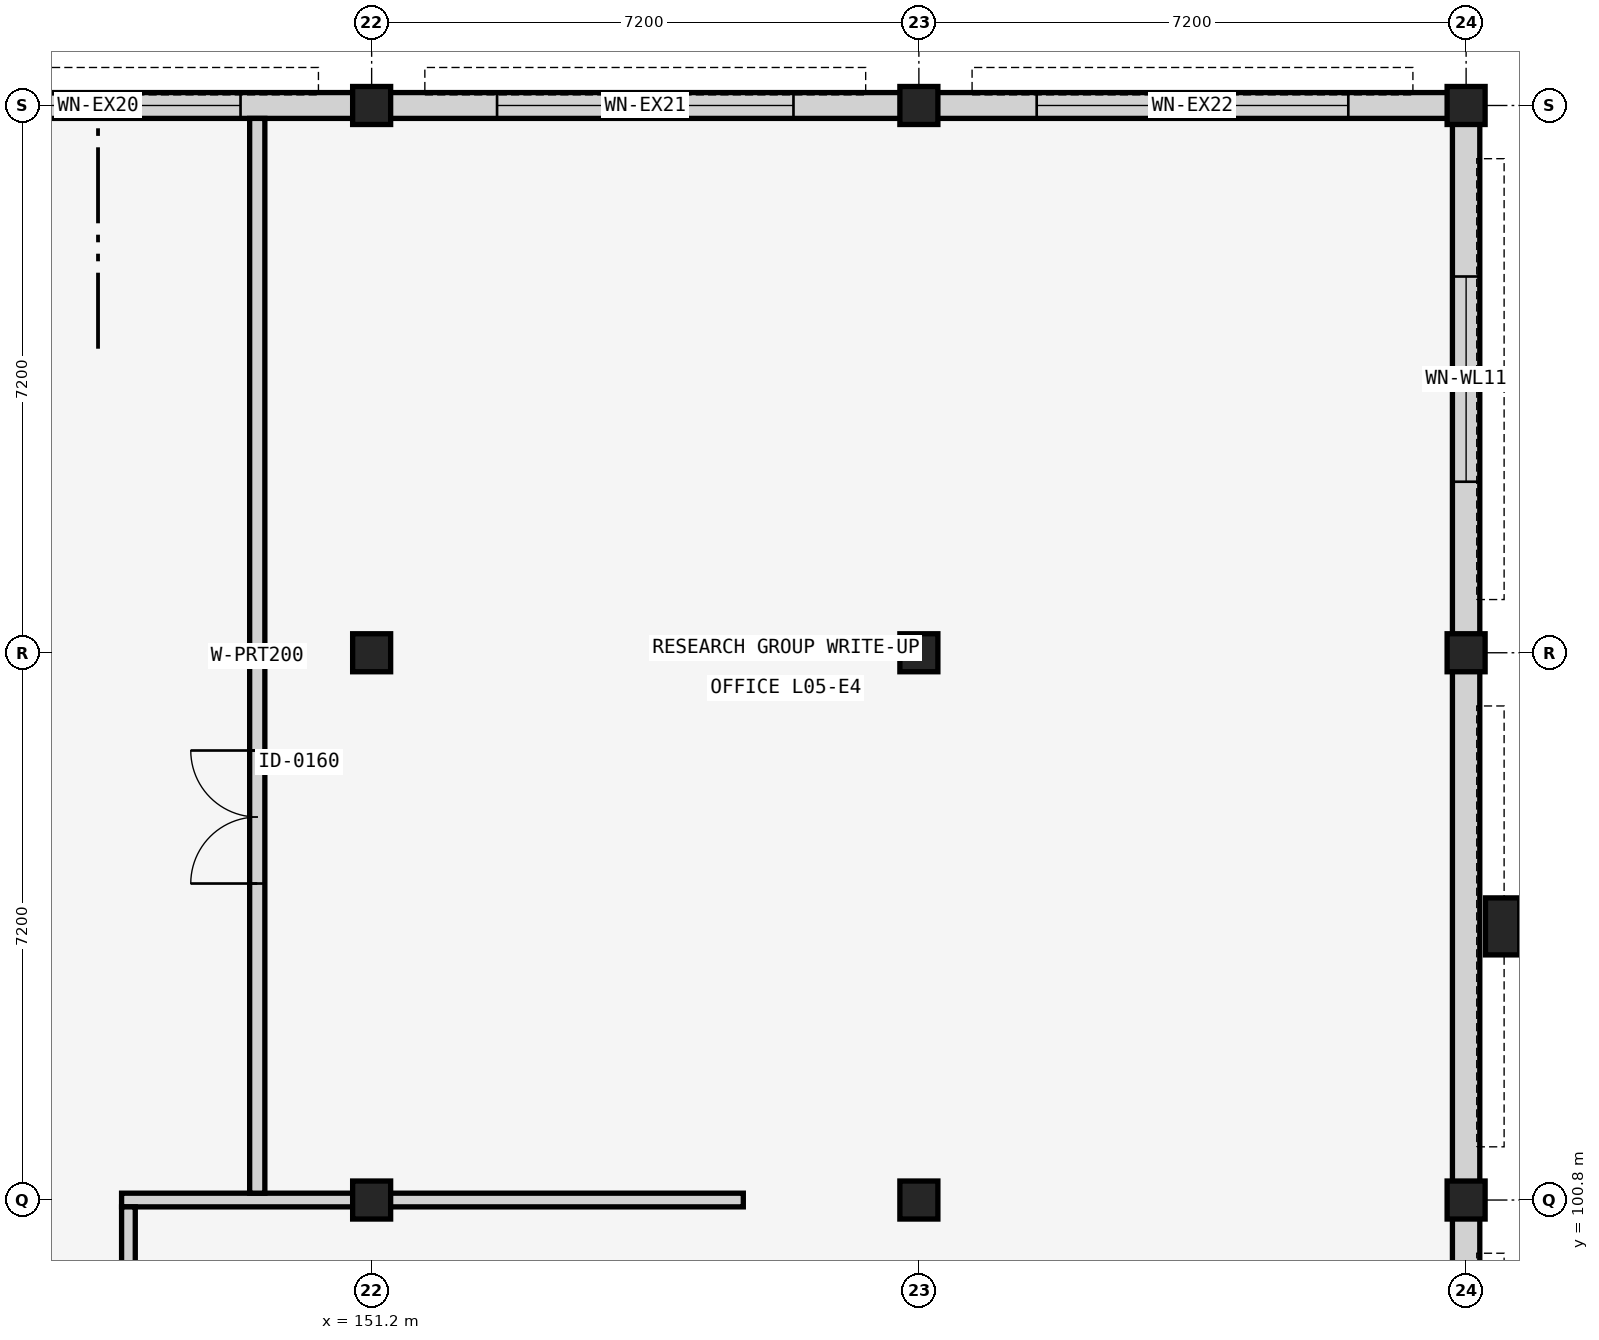
"""IFC4 building model, lengths in metres.
Left out: names, types, materials, properties, quantities, classifications, styles, units other than length and angle.
Written with IfcOpenShell. Run it as: python <this file> out.ifc"""

import sys

from ifc_helpers import new_model, si_unit, direction, frame, frame_2d, origin, origin_2d, place, context, subcontext, project, spatial, rectangle, extrude, element, fill, save


model = new_model("IFC4")
c1 = context("Model", 3, precision=1e-05, world=origin(), true_north=direction((0.0, 1.0)))
c2 = subcontext(c1, "Body", "Model", "MODEL_VIEW")
j1 = project(units=[si_unit("LENGTHUNIT", "METRE"), si_unit("PLANEANGLEUNIT", "RADIAN")], contexts=[c1])
p1 = place(None, origin())
s1 = spatial("IfcSite", under=j1, at=p1, CompositionType="ELEMENT")
p2 = place(p1, origin())
s2 = spatial("IfcBuilding", under=s1, at=p2, CompositionType="ELEMENT")
p3 = place(p2, frame((0.0, 0.0, 21.44)))
s3 = spatial("IfcBuildingStorey", under=s2, at=p3, CompositionType="ELEMENT", Elevation=21.44)
for number, where, z_axis, x_axis in (
    (1, (151.2, 100.8, 0.0), (0.0, 0.0, 1.0), (1.0, 0.0, 0.0)),
    (2, (151.2, 108.0, 0.0), (0.0, 0.0, 1.0), (1.0, 0.0, 0.0)),
    (3, (151.2, 115.2, 0.0), (0.0, 0.0, 1.0), (1.0, 0.0, 0.0)),
    (4, (158.4, 100.8, 0.0), (0.0, 0.0, 1.0), (1.0, 0.0, 0.0)),
    (5, (158.4, 108.0, 0.0), (0.0, 0.0, 1.0), (1.0, 0.0, 0.0)),
    (6, (158.4, 115.2, 0.0), (0.0, 0.0, 1.0), (1.0, 0.0, 0.0)),
    (7, (165.6, 100.8, 0.0), (0.0, 0.0, 1.0), (1.0, 0.0, 0.0)),
    (8, (165.6, 108.0, 0.0), (0.0, 0.0, 1.0), (1.0, 0.0, 0.0)),
    (9, (165.6, 115.2, 0.0), (0.0, 0.0, 1.0), (1.0, 0.0, 0.0)),
):
    element("IfcColumn", number, at=place(p3, frame(where, z_axis=z_axis, x_axis=x_axis)), inside=s3, PredefinedType="COLUMN", context=c2, shape_type="SweptSolid", body=[
        extrude(rectangle(XDim=0.5, YDim=0.5, at=origin_2d()), origin(), (0.0, 0.0, 1.0), 4.16),
    ])
p4 = place(p3, frame((166.08, 104.4, 0.0), z_axis=(0.0, 0.0, 1.0), x_axis=(1.0, 0.0, 0.0)))
e10 = element("IfcColumn", 10, at=p4, inside=s3, PredefinedType="PILASTER", context=c2, shape_type="SweptSolid", body=[
    extrude(rectangle(XDim=0.45, YDim=0.75, at=origin_2d()), origin(), (0.0, 0.0, 1.0), 4.16),
])
p5 = place(p3, frame((165.6, 93.84, 0.0), z_axis=(0.0, 0.0, 1.0), x_axis=(0.0, 1.0, 0.0)))
e11 = element("IfcWall", 11, at=p5, inside=s3, PredefinedType="SOLIDWALL", context=c2, shape_type="SweptSolid", body=[
    extrude(rectangle(XDim=6.72, YDim=0.36, at=frame_2d((3.36, 0.0))), origin(), (0.0, 0.0, 1.0), 3.16),
])
p6 = place(p5, frame((2.31, 0.0, 0.95)))
e12 = element("IfcOpeningElement", 12, at=p6, cuts=e11, PredefinedType="OPENING", context=c2, shape_type="SweptSolid", body=[
    extrude(rectangle(XDim=2.1, YDim=1.8, at=frame_2d((1.05, 0.9))), frame((0.0, 0.19, 0.0), z_axis=(0.0, -1.0, 0.0), x_axis=(1.0, 0.0, 0.0)), (0.0, 0.0, 1.0), 0.38),
])
p7 = place(p3, frame((165.6, 101.04, 0.0), z_axis=(0.0, 0.0, 1.0), x_axis=(0.0, 1.0, 0.0)))
e13 = element("IfcWall", 13, at=p7, inside=s3, PredefinedType="SOLIDWALL", context=c2, shape_type="SweptSolid", body=[
    extrude(rectangle(XDim=6.72, YDim=0.36, at=frame_2d((3.36, 0.0))), origin(), (0.0, 0.0, 1.0), 3.16),
])
p8 = place(p3, frame((165.6, 108.24, 0.0), z_axis=(0.0, 0.0, 1.0), x_axis=(0.0, 1.0, 0.0)))
e14 = element("IfcWall", 14, at=p8, inside=s3, PredefinedType="SOLIDWALL", context=c2, shape_type="SweptSolid", body=[
    extrude(rectangle(XDim=6.72, YDim=0.36, at=frame_2d((3.36, 0.0))), origin(), (0.0, 0.0, 1.0), 3.16),
])
p9 = place(p8, frame((2.01, 0.0, 0.95)))
e15 = element("IfcOpeningElement", 15, at=p9, cuts=e14, PredefinedType="OPENING", context=c2, shape_type="SweptSolid", body=[
    extrude(rectangle(XDim=2.7, YDim=1.8, at=frame_2d((1.35, 0.9))), frame((0.0, 0.19, 0.0), z_axis=(0.0, -1.0, 0.0), x_axis=(1.0, 0.0, 0.0)), (0.0, 0.0, 1.0), 0.38),
])
p10 = place(p3, frame((144.24, 115.2, 0.0), z_axis=(0.0, 0.0, 1.0), x_axis=(1.0, 0.0, 0.0)))
e16 = element("IfcWall", 16, at=p10, inside=s3, PredefinedType="SOLIDWALL", context=c2, shape_type="SweptSolid", body=[
    extrude(rectangle(XDim=6.72, YDim=0.34, at=frame_2d((3.36, 0.0))), origin(), (0.0, 0.0, 1.0), 3.21),
])
p11 = place(p10, frame((1.485, 0.0, 0.95)))
e17 = element("IfcOpeningElement", 17, at=p11, cuts=e16, PredefinedType="OPENING", context=c2, shape_type="SweptSolid", body=[
    extrude(rectangle(XDim=3.75, YDim=1.75, at=frame_2d((1.875, 0.875))), frame((0.0, 0.18, 0.0), z_axis=(0.0, -1.0, 0.0), x_axis=(1.0, 0.0, 0.0)), (0.0, 0.0, 1.0), 0.36),
])
p12 = place(p3, frame((151.44, 115.2, 0.0), z_axis=(0.0, 0.0, 1.0), x_axis=(1.0, 0.0, 0.0)))
e18 = element("IfcWall", 18, at=p12, inside=s3, PredefinedType="SOLIDWALL", context=c2, shape_type="SweptSolid", body=[
    extrude(rectangle(XDim=6.72, YDim=0.34, at=frame_2d((3.36, 0.0))), origin(), (0.0, 0.0, 1.0), 3.21),
])
p13 = place(p12, frame((1.41, 0.0, 0.95)))
e19 = element("IfcOpeningElement", 19, at=p13, cuts=e18, PredefinedType="OPENING", context=c2, shape_type="SweptSolid", body=[
    extrude(rectangle(XDim=3.9, YDim=2.05, at=frame_2d((1.95, 1.025))), frame((0.0, 0.18, 0.0), z_axis=(0.0, -1.0, 0.0), x_axis=(1.0, 0.0, 0.0)), (0.0, 0.0, 1.0), 0.36),
])
p14 = place(p3, frame((158.64, 115.2, 0.0), z_axis=(0.0, 0.0, 1.0), x_axis=(1.0, 0.0, 0.0)))
e20 = element("IfcWall", 20, at=p14, inside=s3, PredefinedType="SOLIDWALL", context=c2, shape_type="SweptSolid", body=[
    extrude(rectangle(XDim=6.72, YDim=0.34, at=frame_2d((3.36, 0.0))), origin(), (0.0, 0.0, 1.0), 3.21),
])
p15 = place(p14, frame((1.31, 0.0, 0.95)))
e21 = element("IfcOpeningElement", 21, at=p15, cuts=e20, PredefinedType="OPENING", context=c2, shape_type="SweptSolid", body=[
    extrude(rectangle(XDim=4.1, YDim=2.05, at=frame_2d((2.05, 1.025))), frame((0.0, 0.18, 0.0), z_axis=(0.0, -1.0, 0.0), x_axis=(1.0, 0.0, 0.0)), (0.0, 0.0, 1.0), 0.36),
])
p16 = place(p3, frame((147.91, 100.8, 0.0), z_axis=(0.0, 0.0, 1.0), x_axis=(1.0, 0.0, 0.0)))
e22 = element("IfcWall", 22, at=p16, inside=s3, PredefinedType="PARTITIONING", context=c2, shape_type="SweptSolid", body=[
    extrude(rectangle(XDim=8.18, YDim=0.18, at=frame_2d((4.09, 0.0))), origin(), (0.0, 0.0, 1.0), 3.16),
])
p17 = place(p3, frame((148.0, 71.89, 0.0), z_axis=(0.0, 0.0, 1.0), x_axis=(0.0, 1.0, 0.0)))
e23 = element("IfcWall", 23, at=p17, inside=s3, PredefinedType="PARTITIONING", context=c2, shape_type="SweptSolid", body=[
    extrude(rectangle(XDim=28.82, YDim=0.18, at=frame_2d((14.41, 0.0))), origin(), (0.0, 0.0, 1.0), 3.16),
])
p18 = place(p17, frame((13.685, 0.0, 0.0)))
e24 = element("IfcOpeningElement", 24, at=p18, cuts=e23, PredefinedType="OPENING", context=c2, shape_type="SweptSolid", body=[
    extrude(rectangle(XDim=1.45, YDim=2.2, at=frame_2d((0.725, 1.1))), frame((0.0, 0.1, 0.0), z_axis=(0.0, -1.0, 0.0), x_axis=(1.0, 0.0, 0.0)), (0.0, 0.0, 1.0), 0.2),
])
p19 = place(p3, frame((149.695, 100.89, 0.0), z_axis=(0.0, 0.0, 1.0), x_axis=(0.0, 1.0, 0.0)))
e25 = element("IfcWall", 25, at=p19, inside=s3, PredefinedType="PARTITIONING", context=c2, shape_type="SweptSolid", body=[
    extrude(rectangle(XDim=14.14, YDim=0.2, at=frame_2d((7.07, 0.0))), origin(), (0.0, 0.0, 1.0), 3.16),
])
p20 = place(p19, frame((4.074, 0.0, 0.0)))
e26 = element("IfcOpeningElement", 26, at=p20, cuts=e25, PredefinedType="OPENING", context=c2, shape_type="SweptSolid", body=[
    extrude(rectangle(XDim=1.75, YDim=2.25, at=frame_2d((0.875, 1.125))), frame((0.0, 0.11, 0.0), z_axis=(0.0, -1.0, 0.0), x_axis=(1.0, 0.0, 0.0)), (0.0, 0.0, 1.0), 0.22),
])
p21 = place(p9, origin())
e27 = element("IfcWindow", 27, at=p21, inside=s3, PartitioningType="SINGLE_PANEL", PredefinedType="WINDOW", context=c2, shape_type="SweptSolid", body=[
    extrude(rectangle(XDim=2.7, YDim=1.8, at=frame_2d((1.35, 0.9))), frame((0.0, 0.03, 0.0), z_axis=(0.0, -1.0, 0.0), x_axis=(1.0, 0.0, 0.0)), (0.0, 0.0, 1.0), 0.06),
])
fill(e15, e27)
p22 = place(p11, origin())
e28 = element("IfcWindow", 28, at=p22, inside=s3, PartitioningType="SINGLE_PANEL", PredefinedType="WINDOW", context=c2, shape_type="SweptSolid", body=[
    extrude(rectangle(XDim=3.75, YDim=1.75, at=frame_2d((1.875, 0.875))), frame((0.0, 0.03, 0.0), z_axis=(0.0, -1.0, 0.0), x_axis=(1.0, 0.0, 0.0)), (0.0, 0.0, 1.0), 0.06),
])
fill(e17, e28)
p23 = place(p13, origin())
e29 = element("IfcWindow", 29, at=p23, inside=s3, PartitioningType="SINGLE_PANEL", PredefinedType="WINDOW", context=c2, shape_type="SweptSolid", body=[
    extrude(rectangle(XDim=3.9, YDim=2.05, at=frame_2d((1.95, 1.025))), frame((0.0, 0.03, 0.0), z_axis=(0.0, -1.0, 0.0), x_axis=(1.0, 0.0, 0.0)), (0.0, 0.0, 1.0), 0.06),
])
fill(e19, e29)
p24 = place(p15, origin())
e30 = element("IfcWindow", 30, at=p24, inside=s3, PartitioningType="SINGLE_PANEL", PredefinedType="WINDOW", context=c2, shape_type="SweptSolid", body=[
    extrude(rectangle(XDim=4.1, YDim=2.05, at=frame_2d((2.05, 1.025))), frame((0.0, 0.03, 0.0), z_axis=(0.0, -1.0, 0.0), x_axis=(1.0, 0.0, 0.0)), (0.0, 0.0, 1.0), 0.06),
])
fill(e21, e30)
p25 = place(p20, origin())
e31 = element("IfcDoor", 31, at=p25, inside=s3, OperationType="DOUBLE_DOOR_SINGLE_SWING", PredefinedType="DOOR", context=c2, shape_type="SweptSolid", body=[
    extrude(rectangle(XDim=1.75, YDim=2.25, at=frame_2d((0.875, 1.125))), frame((0.0, 0.025, 0.0), z_axis=(0.0, -1.0, 0.0), x_axis=(1.0, 0.0, 0.0)), (0.0, 0.0, 1.0), 0.05),
])
fill(e26, e31)
save(model, sys.argv[1])
